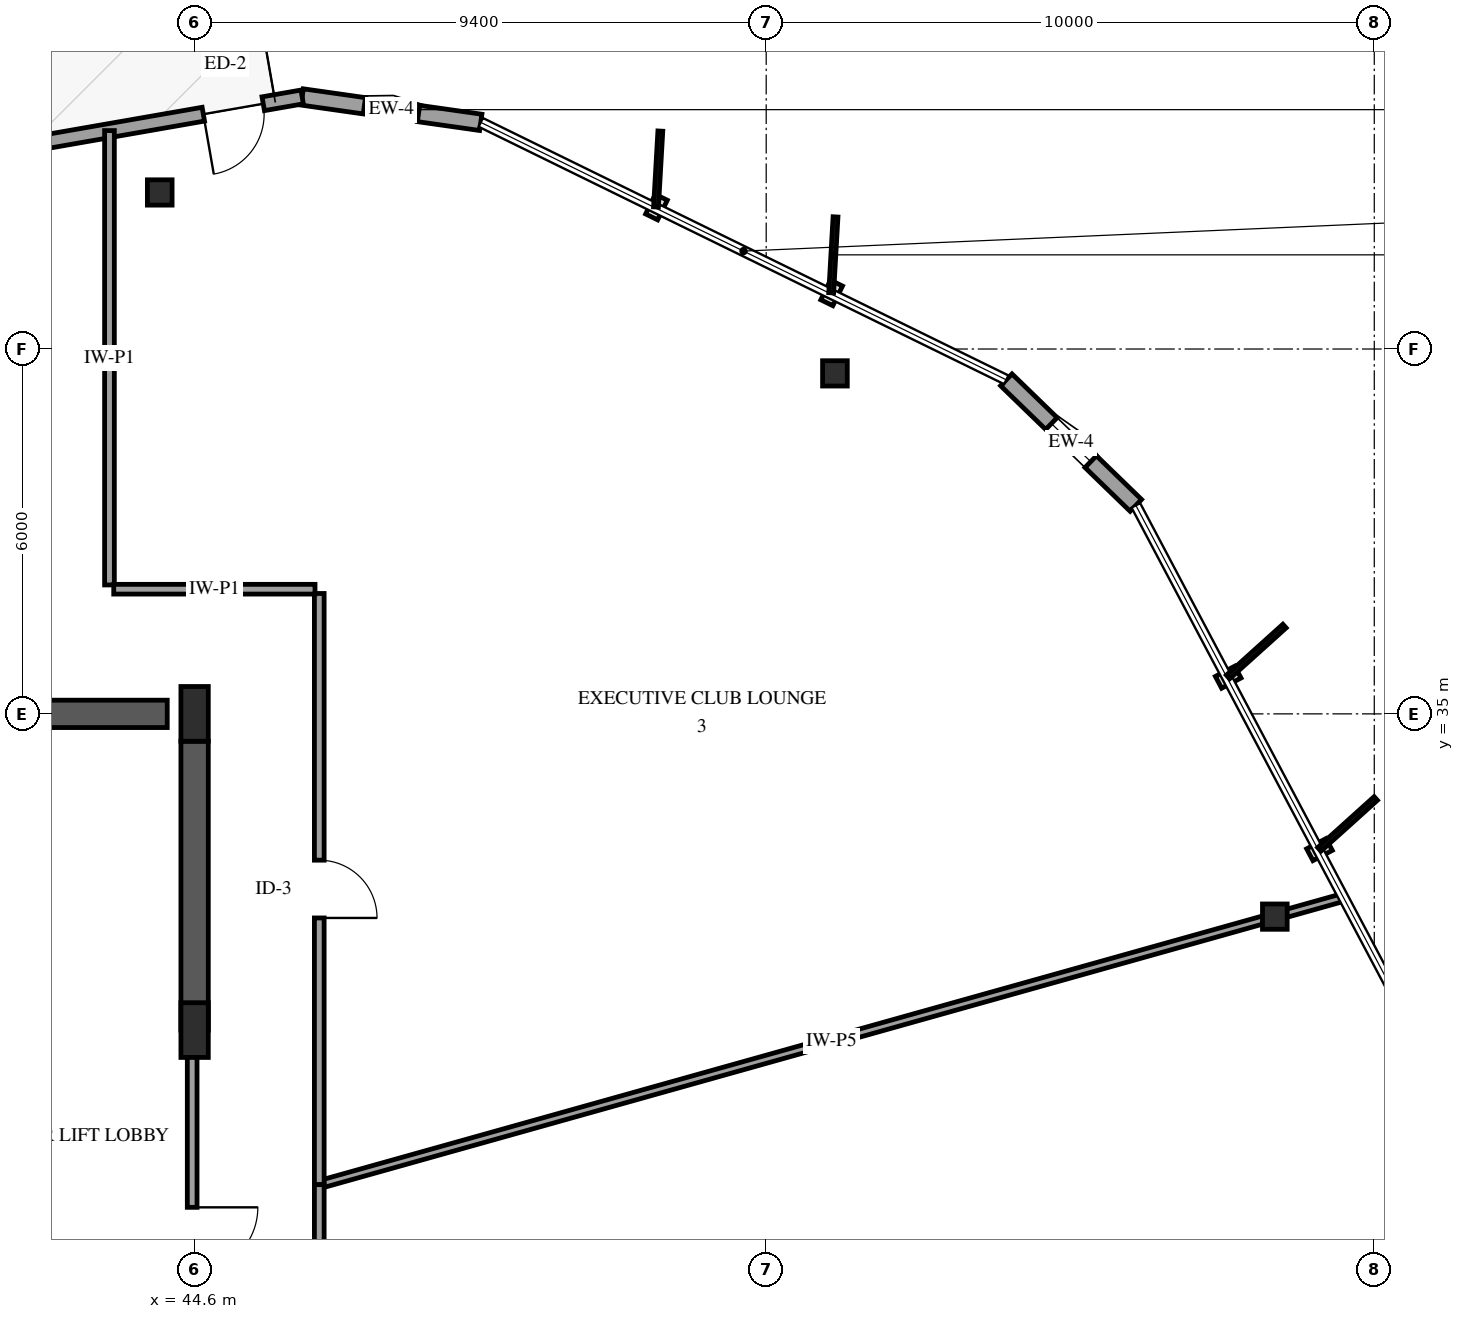
"""IFC4 building model, lengths in metres.
Left out: names, types, materials, properties, quantities, classifications, styles, units other than length and angle.
Written with IfcOpenShell. Run it as: python <this file> out.ifc"""

import sys

from ifc_helpers import new_model, si_unit, direction, frame, frame_2d, origin, origin_2d, place, context, subcontext, project, spatial, rectangle, i_section, extrude, element, fill, save


model = new_model("IFC4")
c1 = context("Model", 3, precision=1e-05, world=origin(), true_north=direction((0.0, 1.0)))
c2 = subcontext(c1, "Body", "Model", "MODEL_VIEW")
j1 = project(units=[si_unit("LENGTHUNIT", "METRE"), si_unit("PLANEANGLEUNIT", "RADIAN")], contexts=[c1])
p1 = place(None, origin())
s1 = spatial("IfcSite", under=j1, at=p1, CompositionType="ELEMENT")
p2 = place(p1, origin())
s2 = spatial("IfcBuilding", under=s1, at=p2, CompositionType="ELEMENT")
p3 = place(p2, frame((0.0, 0.0, 201.4)))
s3 = spatial("IfcBuildingStorey", under=s2, at=p3, CompositionType="ELEMENT", Elevation=201.4)
p4 = place(p3, frame((41.3, 35.0, 0.0), z_axis=(0.0, 0.0, 1.0), x_axis=(1.0, 0.0, 0.0)))
e1 = element("IfcWall", 1, at=p4, inside=s3, PredefinedType="SHEAR", context=c2, shape_type="SweptSolid", body=[
    extrude(rectangle(XDim=2.85, YDim=0.45, at=frame_2d((1.425, 0.0))), origin(), (0.0, 0.0, 1.0), 3.6),
])
p5 = place(p3, frame((44.6, 29.8, 0.0), z_axis=(0.0, 0.0, 1.0), x_axis=(0.0, 1.0, 0.0)))
e2 = element("IfcWall", 2, at=p5, inside=s3, PredefinedType="SHEAR", context=c2, shape_type="SweptSolid", body=[
    extrude(rectangle(XDim=4.75, YDim=0.45, at=frame_2d((2.375, 0.0))), origin(), (0.0, 0.0, 1.0), 3.6),
])
for number, where, z_axis, x_axis in (
    (3, (44.6, 29.8, 0.0), (0.0, 0.0, 1.0), (1.0, 0.0, 0.0)),
    (4, (44.6, 35.0, 0.0), (0.0, 0.0, 1.0), (1.0, 0.0, 0.0)),
):
    element("IfcColumn", number, at=place(p3, frame(where, z_axis=z_axis, x_axis=x_axis)), inside=s3, PredefinedType="PILASTER", context=c2, shape_type="SweptSolid", body=[
        extrude(rectangle(XDim=0.45, YDim=0.9, at=origin_2d()), origin(), (0.0, 0.0, 1.0), 3.6),
    ])
for number, where, z_axis, x_axis in (
    (5, (62.365, 31.666, 0.0), (0.0, 0.0, 1.0), (1.0, 0.0, 0.0)),
    (6, (55.13, 40.599, 0.0), (0.0, 0.0, 1.0), (1.0, 0.0, 0.0)),
    (7, (44.027, 43.574, 0.0), (0.0, 0.0, 1.0), (1.0, 0.0, 0.0)),
):
    element("IfcColumn", number, at=place(p3, frame(where, z_axis=z_axis, x_axis=x_axis)), inside=s3, PredefinedType="COLUMN", context=c2, shape_type="SweptSolid", body=[
        extrude(i_section(OverallWidth=0.406, OverallDepth=0.416, WebThickness=0.03, FlangeThickness=0.048, FilletRadius=0.038, at=origin_2d()), origin(), (0.0, 0.0, 1.0), 3.6),
    ])
p6 = place(p3, frame((49.306, 44.727, 0.0), z_axis=(0.0, 0.0, 1.0), x_axis=(-0.990025064431, 0.14089134749, 0.0)))
e8 = element("IfcWall", 8, at=p6, inside=s3, PredefinedType="SOLIDWALL", context=c2, shape_type="SweptSolid", body=[
    extrude(rectangle(XDim=2.967, YDim=0.27, at=frame_2d((1.483, 0.0))), origin(), (0.0, 0.0, 1.0), 2.679),
])
p7 = place(p6, frame((1.033, 0.0, 0.75)))
e9 = element("IfcOpeningElement", 9, at=p7, cuts=e8, PredefinedType="OPENING", context=c2, shape_type="SweptSolid", body=[
    extrude(rectangle(XDim=0.9, YDim=1.5, at=frame_2d((0.45, 0.75))), frame((0.0, 0.145, 0.0), z_axis=(0.0, -1.0, 0.0), x_axis=(1.0, 0.0, 0.0)), (0.0, 0.0, 1.0), 0.29),
])
p8 = place(p3, frame((46.369, 45.145, 0.0), z_axis=(0.0, 0.0, 1.0), x_axis=(-0.985106934839, -0.171942801338, 0.0)))
e10 = element("IfcWall", 10, at=p8, inside=s3, PredefinedType="SOLIDWALL", context=c2, shape_type="SweptSolid", body=[
    extrude(rectangle(XDim=9.624, YDim=0.23, at=frame_2d((4.812, 0.0))), origin(), (0.0, 0.0, 1.0), 2.679),
])
p9 = place(p8, frame((0.65, 0.0, 0.0)))
e11 = element("IfcOpeningElement", 11, at=p9, cuts=e10, PredefinedType="OPENING", context=c2, shape_type="SweptSolid", body=[
    extrude(rectangle(XDim=1.0, YDim=2.15, at=frame_2d((0.5, 1.075))), frame((0.0, 0.125, 0.0), z_axis=(0.0, -1.0, 0.0), x_axis=(1.0, 0.0, 0.0)), (0.0, 0.0, 1.0), 0.25),
])
p10 = place(p8, frame((5.986, 0.0, 0.72)))
e12 = element("IfcOpeningElement", 12, at=p10, cuts=e10, PredefinedType="OPENING", context=c2, shape_type="SweptSolid", body=[
    extrude(rectangle(XDim=1.35, YDim=1.65, at=frame_2d((0.675, 0.825))), frame((0.0, 0.125, 0.0), z_axis=(0.0, -1.0, 0.0), x_axis=(1.0, 0.0, 0.0)), (0.0, 0.0, 1.0), 0.25),
])
p11 = place(p3, frame((63.736, 17.473, 0.0), z_axis=(0.0, 0.0, 1.0), x_axis=(0.14089216596, 0.990024947954, 0.0)))
e13 = element("IfcWall", 13, at=p11, inside=s3, PredefinedType="SOLIDWALL", context=c2, shape_type="SweptSolid", body=[
    extrude(rectangle(XDim=9.624, YDim=0.23, at=frame_2d((4.812, 0.0))), origin(), (0.0, 0.0, 1.0), 2.679),
])
p12 = place(p11, frame((4.312, 0.0, 0.0)))
e14 = element("IfcOpeningElement", 14, at=p12, cuts=e13, PredefinedType="OPENING", context=c2, shape_type="SweptSolid", body=[
    extrude(rectangle(XDim=1.0, YDim=2.15, at=frame_2d((0.5, 1.075))), frame((0.0, 0.125, 0.0), z_axis=(0.0, -1.0, 0.0), x_axis=(1.0, 0.0, 0.0)), (0.0, 0.0, 1.0), 0.25),
])
p13 = place(p11, frame((0.44, 0.0, 0.72)))
e15 = element("IfcOpeningElement", 15, at=p13, cuts=e13, PredefinedType="OPENING", context=c2, shape_type="SweptSolid", body=[
    extrude(rectangle(XDim=1.35, YDim=1.65, at=frame_2d((0.675, 0.825))), frame((0.0, 0.125, 0.0), z_axis=(0.0, -1.0, 0.0), x_axis=(1.0, 0.0, 0.0)), (0.0, 0.0, 1.0), 0.25),
])
p14 = place(p11, frame((5.952, 0.0, 0.72)))
e16 = element("IfcOpeningElement", 16, at=p14, cuts=e13, PredefinedType="OPENING", context=c2, shape_type="SweptSolid", body=[
    extrude(rectangle(XDim=1.35, YDim=1.65, at=frame_2d((0.675, 0.825))), frame((0.0, 0.125, 0.0), z_axis=(0.0, -1.0, 0.0), x_axis=(1.0, 0.0, 0.0)), (0.0, 0.0, 1.0), 0.25),
])
p15 = place(p3, frame((60.079, 38.429, 0.0), z_axis=(0.0, 0.0, 1.0), x_axis=(-0.718088554482, 0.695951742523, 0.0)))
e17 = element("IfcWall", 17, at=p15, inside=s3, PredefinedType="SOLIDWALL", context=c2, shape_type="SweptSolid", body=[
    extrude(rectangle(XDim=2.967, YDim=0.27, at=frame_2d((1.483, 0.0))), origin(), (0.0, 0.0, 1.0), 2.679),
])
p16 = place(p15, frame((1.033, 0.0, 0.75)))
e18 = element("IfcOpeningElement", 18, at=p16, cuts=e17, PredefinedType="OPENING", context=c2, shape_type="SweptSolid", body=[
    extrude(rectangle(XDim=0.9, YDim=1.5, at=frame_2d((0.45, 0.75))), frame((0.0, 0.145, 0.0), z_axis=(0.0, -1.0, 0.0), x_axis=(1.0, 0.0, 0.0)), (0.0, 0.0, 1.0), 0.29),
])
p17 = place(p3, frame((63.492, 31.982, 0.0), z_axis=(0.0, 0.0, 1.0), x_axis=(-0.962843609525, -0.270059592675, 0.0)))
e19 = element("IfcWall", 19, at=p17, inside=s3, PredefinedType="PARTITIONING", context=c2, shape_type="SweptSolid", body=[
    extrude(rectangle(XDim=17.492, YDim=0.13, at=frame_2d((8.746, 0.0))), origin(), (0.0, 0.0, 1.0), 3.3),
])
p18 = place(p3, frame((46.65, 36.98, 0.0), z_axis=(0.0, 0.0, 1.0), x_axis=(0.0, -1.0, 0.0)))
e20 = element("IfcWall", 20, at=p18, inside=s3, PredefinedType="PARTITIONING", context=c2, shape_type="SweptSolid", body=[
    extrude(rectangle(XDim=9.722, YDim=0.16, at=frame_2d((4.861, 0.0))), origin(), (0.0, 0.0, 1.0), 3.3),
])
p19 = place(p18, frame((4.386, 0.0, 0.0)))
e21 = element("IfcOpeningElement", 21, at=p19, cuts=e20, PredefinedType="OPENING", context=c2, shape_type="SweptSolid", body=[
    extrude(rectangle(XDim=0.95, YDim=2.15, at=frame_2d((0.475, 1.075))), frame((0.0, 0.09, 0.0), z_axis=(0.0, -1.0, 0.0), x_axis=(1.0, 0.0, 0.0)), (0.0, 0.0, 1.0), 0.18),
])
p20 = place(p3, frame((46.65, 27.258, 0.0), z_axis=(0.0, 0.0, 1.0), x_axis=(0.0, -1.0, 0.0)))
e22 = element("IfcWall", 22, at=p20, inside=s3, PredefinedType="PARTITIONING", context=c2, shape_type="SweptSolid", body=[
    extrude(rectangle(XDim=8.685, YDim=0.16, at=frame_2d((4.343, 0.0))), origin(), (0.0, 0.0, 1.0), 3.3),
])
p21 = place(p20, frame((3.867, 0.0, 0.0)))
e23 = element("IfcOpeningElement", 23, at=p21, cuts=e22, PredefinedType="OPENING", context=c2, shape_type="SweptSolid", body=[
    extrude(rectangle(XDim=0.95, YDim=2.15, at=frame_2d((0.475, 1.075))), frame((0.0, 0.09, 0.0), z_axis=(0.0, -1.0, 0.0), x_axis=(1.0, 0.0, 0.0)), (0.0, 0.0, 1.0), 0.18),
])
p22 = place(p3, frame((43.2, 44.592, 0.0), z_axis=(0.0, 0.0, 1.0), x_axis=(0.0, -1.0, 0.0)))
e24 = element("IfcWall", 24, at=p22, inside=s3, PredefinedType="PARTITIONING", context=c2, shape_type="SweptSolid", body=[
    extrude(rectangle(XDim=7.472, YDim=0.16, at=frame_2d((3.736, 0.0))), origin(), (0.0, 0.0, 1.0), 2.595),
])
p23 = place(p3, frame((44.56, 29.8, 0.0), z_axis=(0.0, 0.0, 1.0), x_axis=(0.0, -1.0, 0.0)))
e25 = element("IfcWall", 25, at=p23, inside=s3, PredefinedType="PARTITIONING", context=c2, shape_type="SweptSolid", body=[
    extrude(rectangle(XDim=6.91, YDim=0.16, at=frame_2d((3.455, 0.0))), origin(), (0.0, 0.0, 1.0), 2.34),
])
p24 = place(p23, frame((2.915, 0.0, 0.0)))
e26 = element("IfcOpeningElement", 26, at=p24, cuts=e25, PredefinedType="OPENING", context=c2, shape_type="SweptSolid", body=[
    extrude(rectangle(XDim=1.08, YDim=2.15, at=frame_2d((0.54, 1.075))), frame((0.0, 0.09, 0.0), z_axis=(0.0, -1.0, 0.0), x_axis=(1.0, 0.0, 0.0)), (0.0, 0.0, 1.0), 0.18),
])
p25 = place(p3, frame((43.27, 37.05, 0.0), z_axis=(0.0, 0.0, 1.0), x_axis=(1.0, 0.0, 0.0)))
e27 = element("IfcWall", 27, at=p25, inside=s3, PredefinedType="PARTITIONING", context=c2, shape_type="SweptSolid", body=[
    extrude(rectangle(XDim=3.31, YDim=0.16, at=frame_2d((1.655, 0.0))), origin(), (0.0, 0.0, 1.0), 3.3),
])
p26 = place(p7, origin())
e28 = element("IfcWindow", 28, at=p26, inside=s3, PartitioningType="SINGLE_PANEL", PredefinedType="WINDOW", context=c2, shape_type="SweptSolid", body=[
    extrude(rectangle(XDim=0.9, YDim=1.5, at=frame_2d((0.45, 0.75))), frame((0.0, 0.03, 0.0), z_axis=(0.0, -1.0, 0.0), x_axis=(1.0, 0.0, 0.0)), (0.0, 0.0, 1.0), 0.06),
])
fill(e9, e28)
p27 = place(p9, origin())
e29 = element("IfcDoor", 29, at=p27, inside=s3, OperationType="SINGLE_SWING_RIGHT", PredefinedType="DOOR", context=c2, shape_type="SweptSolid", body=[
    extrude(rectangle(XDim=1.0, YDim=2.15, at=frame_2d((0.5, 1.075))), frame((0.0, 0.025, 0.0), z_axis=(0.0, -1.0, 0.0), x_axis=(1.0, 0.0, 0.0)), (0.0, 0.0, 1.0), 0.05),
])
fill(e11, e29)
p28 = place(p16, origin())
e30 = element("IfcWindow", 30, at=p28, inside=s3, PartitioningType="SINGLE_PANEL", PredefinedType="WINDOW", context=c2, shape_type="SweptSolid", body=[
    extrude(rectangle(XDim=0.9, YDim=1.5, at=frame_2d((0.45, 0.75))), frame((0.0, 0.03, 0.0), z_axis=(0.0, -1.0, 0.0), x_axis=(1.0, 0.0, 0.0)), (0.0, 0.0, 1.0), 0.06),
])
fill(e18, e30)
p29 = place(p19, origin())
e31 = element("IfcDoor", 31, at=p29, inside=s3, OperationType="SINGLE_SWING_RIGHT", PredefinedType="DOOR", context=c2, shape_type="SweptSolid", body=[
    extrude(rectangle(XDim=0.95, YDim=2.15, at=frame_2d((0.475, 1.075))), frame((0.0, 0.025, 0.0), z_axis=(0.0, -1.0, 0.0), x_axis=(1.0, 0.0, 0.0)), (0.0, 0.0, 1.0), 0.05),
])
fill(e21, e31)
p30 = place(p24, origin())
e32 = element("IfcDoor", 32, at=p30, inside=s3, OperationType="SINGLE_SWING_LEFT", PredefinedType="DOOR", context=c2, shape_type="SweptSolid", body=[
    extrude(rectangle(XDim=1.08, YDim=2.15, at=frame_2d((0.54, 1.075))), frame((0.0, 0.025, 0.0), z_axis=(0.0, -1.0, 0.0), x_axis=(1.0, 0.0, 0.0)), (0.0, 0.0, 1.0), 0.05),
])
fill(e26, e32)
save(model, sys.argv[1])
